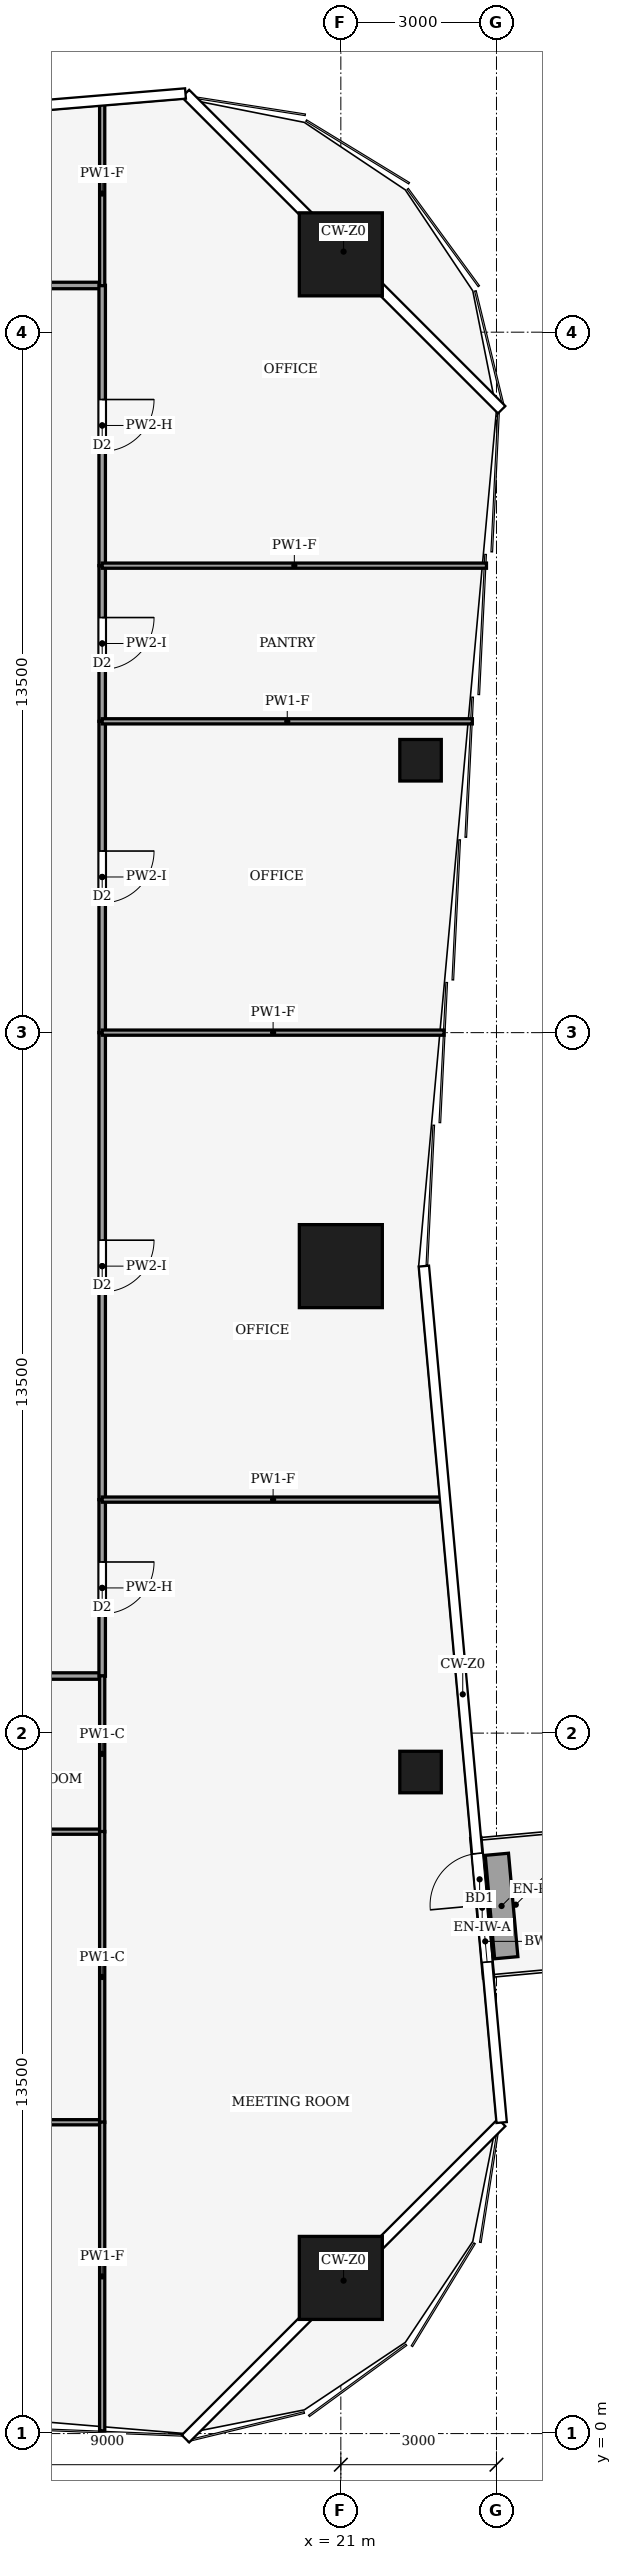
"""IFC4 building model, lengths in metres.
Left out: names, types, materials, properties, quantities, classifications, styles, units other than length and angle.
Written with IfcOpenShell. Run it as: python <this file> out.ifc"""

import sys

from ifc_helpers import new_model, si_unit, direction, frame, frame_2d, origin, origin_2d, place, context, subcontext, project, spatial, rectangle, hollow_rectangle, extrude, element, fill, save


model = new_model("IFC4")
c1 = context("Model", 3, precision=1e-05, world=origin(), true_north=direction((0.0, 1.0)))
c2 = subcontext(c1, "Body", "Model", "MODEL_VIEW")
j1 = project(units=[si_unit("LENGTHUNIT", "METRE"), si_unit("PLANEANGLEUNIT", "RADIAN")], contexts=[c1])
p1 = place(None, origin())
s1 = spatial("IfcSite", under=j1, at=p1, CompositionType="ELEMENT")
p2 = place(p1, origin())
s2 = spatial("IfcBuilding", under=s1, at=p2, CompositionType="ELEMENT")
p3 = place(p2, frame((0.0, 0.0, 30.0)))
s3 = spatial("IfcBuildingStorey", under=s2, at=p3, CompositionType="ELEMENT", Elevation=30.0)
for number, where, z_axis, x_axis in (
    (1, (21.0, 42.0, 0.0), (0.0, 0.0, 1.0), (1.0, 0.0, 0.0)),
    (2, (21.0, 22.5, 0.0), (0.0, 0.0, 1.0), (1.0, 0.0, 0.0)),
    (3, (21.0, 3.0, 0.0), (0.0, 0.0, 1.0), (1.0, 0.0, 0.0)),
):
    element("IfcColumn", number, at=place(p3, frame(where, z_axis=z_axis, x_axis=x_axis)), inside=s3, PredefinedType="COLUMN", context=c2, shape_type="SweptSolid", body=[
        extrude(hollow_rectangle(XDim=1.6, YDim=1.6, WallThickness=0.09, at=origin_2d()), origin(), (0.0, 0.0, 1.0), 4.0),
    ])
for number, where, z_axis, x_axis in (
    (4, (22.536, 12.75, 0.0), (0.0, 0.0, 1.0), (1.0, 0.0, 0.0)),
    (5, (22.536, 32.25, 0.0), (0.0, 0.0, 1.0), (1.0, 0.0, 0.0)),
):
    element("IfcColumn", number, at=place(p3, frame(where, z_axis=z_axis, x_axis=x_axis)), inside=s3, PredefinedType="COLUMN", context=c2, shape_type="SweptSolid", body=[
        extrude(hollow_rectangle(XDim=0.8, YDim=0.8, WallThickness=0.04, at=origin_2d()), origin(), (0.0, 0.0, 1.0), 4.0),
    ])
p4 = place(p3, frame((23.847, 8.789, 0.0), z_axis=(0.0, 0.0, 1.0), x_axis=(-0.090552042494, 0.995891724838, 0.0)))
e6 = element("IfcWall", 6, at=p4, inside=s3, PredefinedType="SOLIDWALL", context=c2, shape_type="SweptSolid", body=[
    extrude(rectangle(XDim=2.701, YDim=0.2, at=frame_2d((1.351, 0.0))), origin(), (0.0, 0.0, 1.0), 3.65),
])
p5 = place(p4, frame((1.401, 0.0, 0.0)))
e7 = element("IfcOpeningElement", 7, at=p5, cuts=e6, PredefinedType="OPENING", context=c2, shape_type="SweptSolid", body=[
    extrude(rectangle(XDim=1.0, YDim=2.1, at=frame_2d((0.5, 1.05))), frame((0.0, 0.11, 0.0), z_axis=(0.0, -1.0, 0.0), x_axis=(1.0, 0.0, 0.0)), (0.0, 0.0, 1.0), 0.22),
])
p6 = place(p4, frame((0.3, 0.0, 0.9)))
e8 = element("IfcOpeningElement", 8, at=p6, cuts=e6, PredefinedType="OPENING", context=c2, shape_type="SweptSolid", body=[
    extrude(rectangle(XDim=0.8, YDim=1.2, at=frame_2d((0.4, 0.6))), frame((0.0, 0.11, 0.0), z_axis=(0.0, -1.0, 0.0), x_axis=(1.0, 0.0, 0.0)), (0.0, 0.0, 1.0), 0.22),
])
p7 = place(p3, frame((24.189, 9.171, 0.0), z_axis=(0.0, 0.0, 1.0), x_axis=(-0.090513748512, 0.995895205998, 0.0)))
e9 = element("IfcWall", 9, at=p7, inside=s3, PredefinedType="USERDEFINED", context=c2, shape_type="SweptSolid", body=[
    extrude(rectangle(XDim=2.001, YDim=0.45, at=frame_2d((1.001, 0.0))), origin(), (0.0, 0.0, 1.0), 0.4),
])
p8 = place(p3, frame((12.0, 14.6, 0.0), z_axis=(0.0, 0.0, 1.0), x_axis=(1.0, 0.0, 0.0)))
e10 = element("IfcWall", 10, at=p8, inside=s3, PredefinedType="PARTITIONING", context=c2, shape_type="SweptSolid", body=[
    extrude(rectangle(XDim=4.4, YDim=0.125, at=frame_2d((2.2, 0.0))), origin(), (0.0, 0.0, 1.0), 3.29),
])
p9 = place(p3, frame((6.0, 41.4, 0.0), z_axis=(0.0, 0.0, 1.0), x_axis=(1.0, 0.0, 0.0)))
e11 = element("IfcWall", 11, at=p9, inside=s3, PredefinedType="PARTITIONING", context=c2, shape_type="SweptSolid", body=[
    extrude(rectangle(XDim=10.4, YDim=0.125, at=frame_2d((5.2, 0.0))), origin(), (0.0, 0.0, 1.0), 3.54),
])
p10 = place(p9, frame((1.9, 0.0, 0.0)))
e12 = element("IfcOpeningElement", 12, at=p10, cuts=e11, PredefinedType="OPENING", context=c2, shape_type="SweptSolid", body=[
    extrude(rectangle(XDim=1.0, YDim=2.1, at=frame_2d((0.5, 1.05))), frame((0.0, 0.073, 0.0), z_axis=(0.0, -1.0, 0.0), x_axis=(1.0, 0.0, 0.0)), (0.0, 0.0, 1.0), 0.145),
])
p11 = place(p3, frame((16.4, 18.0, 0.0), z_axis=(0.0, 0.0, 1.0), x_axis=(0.0, -1.0, 0.0)))
e13 = element("IfcWall", 13, at=p11, inside=s3, PredefinedType="PARTITIONING", context=c2, shape_type="SweptSolid", body=[
    extrude(rectangle(XDim=3.404, YDim=0.125, at=frame_2d((1.702, 0.0))), origin(), (0.0, 0.0, 1.0), 3.14),
])
p12 = place(p11, frame((1.202, 0.0, 0.0)))
e14 = element("IfcOpeningElement", 14, at=p12, cuts=e13, PredefinedType="OPENING", context=c2, shape_type="SweptSolid", body=[
    extrude(rectangle(XDim=1.0, YDim=2.1, at=frame_2d((0.5, 1.05))), frame((0.0, 0.073, 0.0), z_axis=(0.0, -1.0, 0.0), x_axis=(1.0, 0.0, 0.0)), (0.0, 0.0, 1.0), 0.145),
])
p13 = place(p3, frame((16.4, 27.0, 0.0), z_axis=(0.0, 0.0, 1.0), x_axis=(0.0, -1.0, 0.0)))
e15 = element("IfcWall", 15, at=p13, inside=s3, PredefinedType="PARTITIONING", context=c2, shape_type="SweptSolid", body=[
    extrude(rectangle(XDim=9.0, YDim=0.125, at=frame_2d((4.5, 0.0))), origin(), (0.0, 0.0, 1.0), 3.48),
])
p14 = place(p13, frame((4.0, 0.0, 0.0)))
e16 = element("IfcOpeningElement", 16, at=p14, cuts=e15, PredefinedType="OPENING", context=c2, shape_type="SweptSolid", body=[
    extrude(rectangle(XDim=1.0, YDim=2.1, at=frame_2d((0.5, 1.05))), frame((0.0, 0.073, 0.0), z_axis=(0.0, -1.0, 0.0), x_axis=(1.0, 0.0, 0.0)), (0.0, 0.0, 1.0), 0.145),
])
p15 = place(p3, frame((16.4, 33.0, 0.0), z_axis=(0.0, 0.0, 1.0), x_axis=(0.0, -1.0, 0.0)))
e17 = element("IfcWall", 17, at=p15, inside=s3, PredefinedType="PARTITIONING", context=c2, shape_type="SweptSolid", body=[
    extrude(rectangle(XDim=6.0, YDim=0.125, at=frame_2d((3.0, 0.0))), origin(), (0.0, 0.0, 1.0), 3.48),
])
p16 = place(p15, frame((2.5, 0.0, 0.0)))
e18 = element("IfcOpeningElement", 18, at=p16, cuts=e17, PredefinedType="OPENING", context=c2, shape_type="SweptSolid", body=[
    extrude(rectangle(XDim=1.0, YDim=2.1, at=frame_2d((0.5, 1.05))), frame((0.0, 0.073, 0.0), z_axis=(0.0, -1.0, 0.0), x_axis=(1.0, 0.0, 0.0)), (0.0, 0.0, 1.0), 0.145),
])
p17 = place(p3, frame((16.4, 36.0, 0.0), z_axis=(0.0, 0.0, 1.0), x_axis=(0.0, -1.0, 0.0)))
e19 = element("IfcWall", 19, at=p17, inside=s3, PredefinedType="PARTITIONING", context=c2, shape_type="SweptSolid", body=[
    extrude(rectangle(XDim=3.0, YDim=0.125, at=frame_2d((1.5, 0.0))), origin(), (0.0, 0.0, 1.0), 3.48),
])
p18 = place(p17, frame((1.0, 0.0, 0.0)))
e20 = element("IfcOpeningElement", 20, at=p18, cuts=e19, PredefinedType="OPENING", context=c2, shape_type="SweptSolid", body=[
    extrude(rectangle(XDim=1.0, YDim=2.1, at=frame_2d((0.5, 1.05))), frame((0.0, 0.073, 0.0), z_axis=(0.0, -1.0, 0.0), x_axis=(1.0, 0.0, 0.0)), (0.0, 0.0, 1.0), 0.145),
])
p19 = place(p3, frame((16.4, 41.404, 0.0), z_axis=(0.0, 0.0, 1.0), x_axis=(0.0, -1.0, 0.0)))
e21 = element("IfcWall", 21, at=p19, inside=s3, PredefinedType="PARTITIONING", context=c2, shape_type="SweptSolid", body=[
    extrude(rectangle(XDim=5.404, YDim=0.125, at=frame_2d((2.702, 0.0))), origin(), (0.0, 0.0, 1.0), 3.14),
])
p20 = place(p19, frame((2.202, 0.0, 0.0)))
e22 = element("IfcOpeningElement", 22, at=p20, cuts=e21, PredefinedType="OPENING", context=c2, shape_type="SweptSolid", body=[
    extrude(rectangle(XDim=1.0, YDim=2.1, at=frame_2d((0.5, 1.05))), frame((0.0, 0.073, 0.0), z_axis=(0.0, -1.0, 0.0), x_axis=(1.0, 0.0, 0.0)), (0.0, 0.0, 1.0), 0.145),
])
p21 = place(p3, frame((11.996, 11.6, 0.0), z_axis=(0.0, 0.0, 1.0), x_axis=(1.0, 0.0, 0.0)))
e23 = element("IfcWall", 23, at=p21, inside=s3, PredefinedType="PARTITIONING", context=c2, shape_type="SweptSolid", body=[
    extrude(rectangle(XDim=4.404, YDim=0.1, at=frame_2d((2.202, 0.0))), origin(), (0.0, 0.0, 1.0), 3.29),
])
p22 = place(p3, frame((16.4, 11.596, 0.0), z_axis=(0.0, 0.0, 1.0), x_axis=(0.0, 1.0, 0.0)))
e24 = element("IfcWall", 24, at=p22, inside=s3, PredefinedType="PARTITIONING", context=c2, shape_type="SweptSolid", body=[
    extrude(rectangle(XDim=3.008, YDim=0.1, at=frame_2d((1.504, 0.0))), origin(), (0.0, 0.0, 1.0), 3.87),
])
p23 = place(p3, frame((16.4, 6.0, 0.0), z_axis=(0.0, 0.0, 1.0), x_axis=(-1.0, 0.0, 0.0)))
e25 = element("IfcWall", 25, at=p23, inside=s3, PredefinedType="PARTITIONING", context=c2, shape_type="SweptSolid", body=[
    extrude(rectangle(XDim=7.4, YDim=0.1, at=frame_2d((3.7, 0.0))), origin(), (0.0, 0.0, 1.0), 3.29),
])
p24 = place(p23, frame((3.2, 0.0, 0.0)))
e26 = element("IfcOpeningElement", 26, at=p24, cuts=e25, PredefinedType="OPENING", context=c2, shape_type="SweptSolid", body=[
    extrude(rectangle(XDim=1.0, YDim=2.1, at=frame_2d((0.5, 1.05))), frame((0.0, 0.06, 0.0), z_axis=(0.0, -1.0, 0.0), x_axis=(1.0, 0.0, 0.0)), (0.0, 0.0, 1.0), 0.12),
])
p25 = place(p3, frame((16.4, 5.996, 0.0), z_axis=(0.0, 0.0, 1.0), x_axis=(0.0, 1.0, 0.0)))
e27 = element("IfcWall", 27, at=p25, inside=s3, PredefinedType="PARTITIONING", context=c2, shape_type="SweptSolid", body=[
    extrude(rectangle(XDim=5.608, YDim=0.1, at=frame_2d((2.804, 0.0))), origin(), (0.0, 0.0, 1.0), 3.87),
])
p26 = place(p3, frame((16.4, 0.053, 0.0), z_axis=(0.0, 0.0, 1.0), x_axis=(0.0, 1.0, 0.0)))
e28 = element("IfcWall", 28, at=p26, inside=s3, PredefinedType="PARTITIONING", context=c2, shape_type="SweptSolid", body=[
    extrude(rectangle(XDim=5.951, YDim=0.1, at=frame_2d((2.975, 0.0))), origin(), (0.0, 0.0, 1.0), 3.04),
])
p27 = place(p3, frame((16.4, 41.396, 0.0), z_axis=(0.0, 0.0, 1.0), x_axis=(0.0, 1.0, 0.0)))
e29 = element("IfcWall", 29, at=p27, inside=s3, PredefinedType="PARTITIONING", context=c2, shape_type="SweptSolid", body=[
    extrude(rectangle(XDim=3.551, YDim=0.1, at=frame_2d((1.775, 0.0))), origin(), (0.0, 0.0, 1.0), 3.04),
])
for number, where, z_axis, x_axis in (
    (30, (22.989, 18.0, 0.0), (0.0, 0.0, 1.0), (-1.0, 0.0, 0.0)),
    (31, (22.989, 27.0, 0.0), (0.0, 0.0, 1.0), (-1.0, 0.0, 0.0)),
):
    element("IfcWall", number, at=place(p3, frame(where, z_axis=z_axis, x_axis=x_axis)), inside=s3, PredefinedType="PARTITIONING", context=c2, shape_type="SweptSolid", body=[
        extrude(rectangle(XDim=6.589, YDim=0.1, at=frame_2d((3.294, 0.0))), origin(), (0.0, 0.0, 1.0), 3.04),
    ])
p28 = place(p3, frame((23.534, 33.0, 0.0), z_axis=(0.0, 0.0, 1.0), x_axis=(-1.0, 0.0, 0.0)))
e32 = element("IfcWall", 32, at=p28, inside=s3, PredefinedType="PARTITIONING", context=c2, shape_type="SweptSolid", body=[
    extrude(rectangle(XDim=7.135, YDim=0.1, at=frame_2d((3.567, 0.0))), origin(), (0.0, 0.0, 1.0), 3.04),
])
p29 = place(p3, frame((23.807, 36.0, 0.0), z_axis=(0.0, 0.0, 1.0), x_axis=(-1.0, 0.0, 0.0)))
e33 = element("IfcWall", 33, at=p29, inside=s3, PredefinedType="PARTITIONING", context=c2, shape_type="SweptSolid", body=[
    extrude(rectangle(XDim=7.407, YDim=0.1, at=frame_2d((3.704, 0.0))), origin(), (0.0, 0.0, 1.0), 3.04),
])
p30 = place(p5, origin())
e34 = element("IfcDoor", 34, at=p30, inside=s3, OperationType="SINGLE_SWING_RIGHT", PredefinedType="DOOR", context=c2, shape_type="SweptSolid", body=[
    extrude(rectangle(XDim=1.0, YDim=2.1, at=frame_2d((0.5, 1.05))), frame((0.0, 0.025, 0.0), z_axis=(0.0, -1.0, 0.0), x_axis=(1.0, 0.0, 0.0)), (0.0, 0.0, 1.0), 0.05),
])
fill(e7, e34)
p31 = place(p6, origin())
e35 = element("IfcWindow", 35, at=p31, inside=s3, PartitioningType="SINGLE_PANEL", PredefinedType="WINDOW", context=c2, shape_type="SweptSolid", body=[
    extrude(rectangle(XDim=0.8, YDim=1.2, at=frame_2d((0.4, 0.6))), frame((0.0, 0.03, 0.0), z_axis=(0.0, -1.0, 0.0), x_axis=(1.0, 0.0, 0.0)), (0.0, 0.0, 1.0), 0.06),
])
fill(e8, e35)
p32 = place(p12, origin())
e36 = element("IfcDoor", 36, at=p32, inside=s3, OperationType="SINGLE_SWING_LEFT", PredefinedType="DOOR", context=c2, shape_type="SweptSolid", body=[
    extrude(rectangle(XDim=1.0, YDim=2.1, at=frame_2d((0.5, 1.05))), frame((0.0, 0.025, 0.0), z_axis=(0.0, -1.0, 0.0), x_axis=(1.0, 0.0, 0.0)), (0.0, 0.0, 1.0), 0.05),
])
fill(e14, e36)
p33 = place(p14, origin())
e37 = element("IfcDoor", 37, at=p33, inside=s3, OperationType="SINGLE_SWING_RIGHT", PredefinedType="DOOR", context=c2, shape_type="SweptSolid", body=[
    extrude(rectangle(XDim=1.0, YDim=2.1, at=frame_2d((0.5, 1.05))), frame((0.0, 0.025, 0.0), z_axis=(0.0, -1.0, 0.0), x_axis=(1.0, 0.0, 0.0)), (0.0, 0.0, 1.0), 0.05),
])
fill(e16, e37)
p34 = place(p16, origin())
e38 = element("IfcDoor", 38, at=p34, inside=s3, OperationType="SINGLE_SWING_LEFT", PredefinedType="DOOR", context=c2, shape_type="SweptSolid", body=[
    extrude(rectangle(XDim=1.0, YDim=2.1, at=frame_2d((0.5, 1.05))), frame((0.0, 0.025, 0.0), z_axis=(0.0, -1.0, 0.0), x_axis=(1.0, 0.0, 0.0)), (0.0, 0.0, 1.0), 0.05),
])
fill(e18, e38)
p35 = place(p18, origin())
e39 = element("IfcDoor", 39, at=p35, inside=s3, OperationType="SINGLE_SWING_RIGHT", PredefinedType="DOOR", context=c2, shape_type="SweptSolid", body=[
    extrude(rectangle(XDim=1.0, YDim=2.1, at=frame_2d((0.5, 1.05))), frame((0.0, 0.025, 0.0), z_axis=(0.0, -1.0, 0.0), x_axis=(1.0, 0.0, 0.0)), (0.0, 0.0, 1.0), 0.05),
])
fill(e20, e39)
p36 = place(p20, origin())
e40 = element("IfcDoor", 40, at=p36, inside=s3, OperationType="SINGLE_SWING_LEFT", PredefinedType="DOOR", context=c2, shape_type="SweptSolid", body=[
    extrude(rectangle(XDim=1.0, YDim=2.1, at=frame_2d((0.5, 1.05))), frame((0.0, 0.025, 0.0), z_axis=(0.0, -1.0, 0.0), x_axis=(1.0, 0.0, 0.0)), (0.0, 0.0, 1.0), 0.05),
])
fill(e22, e40)
save(model, sys.argv[1])
